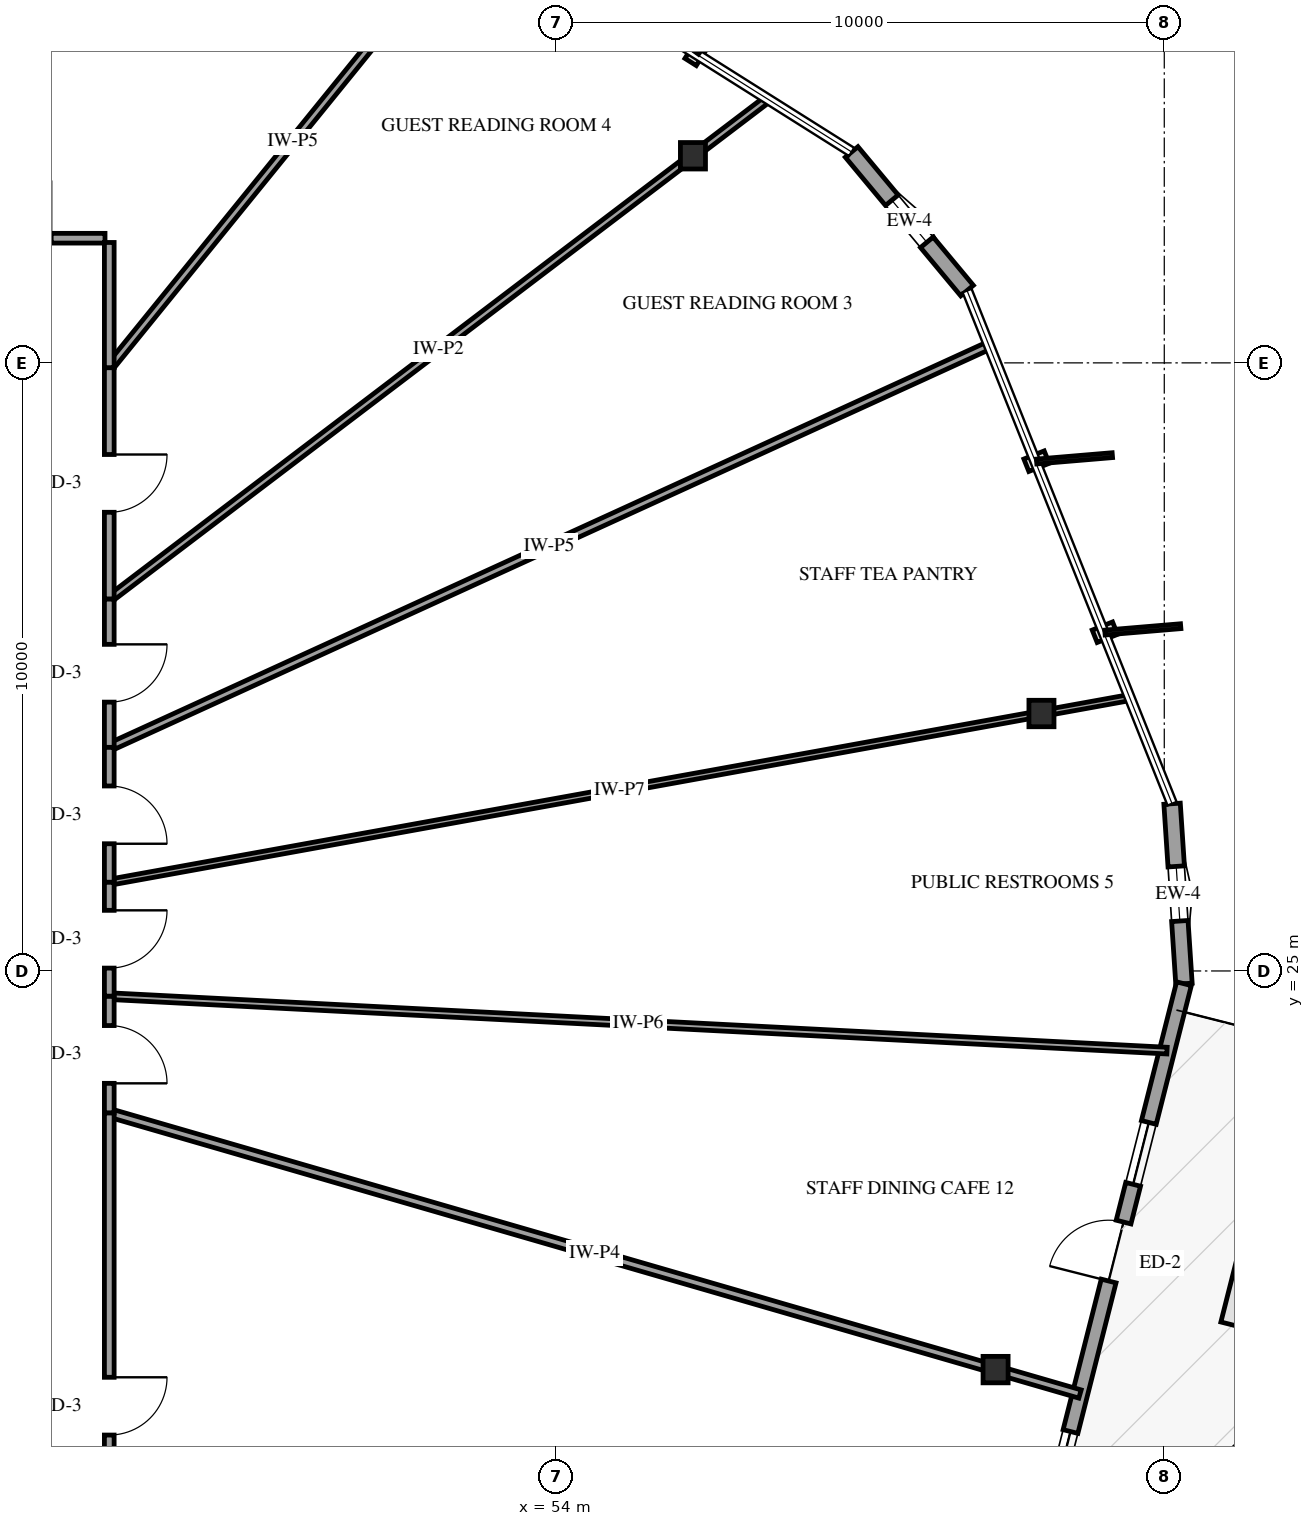
"""IFC4 building model, lengths in metres.
Left out: names, types, materials, properties, quantities, classifications, styles, units other than length and angle.
Written with IfcOpenShell. Run it as: python <this file> out.ifc"""

import sys

from ifc_helpers import new_model, si_unit, direction, frame, frame_2d, origin, origin_2d, place, context, subcontext, project, spatial, rectangle, i_section, extrude, element, fill, save


model = new_model("IFC4")
c1 = context("Model", 3, precision=1e-05, world=origin(), true_north=direction((0.0, 1.0)))
c2 = subcontext(c1, "Body", "Model", "MODEL_VIEW")
j1 = project(units=[si_unit("LENGTHUNIT", "METRE"), si_unit("PLANEANGLEUNIT", "RADIAN")], contexts=[c1])
p1 = place(None, origin())
s1 = spatial("IfcSite", under=j1, at=p1, CompositionType="ELEMENT")
p2 = place(p1, origin())
s2 = spatial("IfcBuilding", under=s1, at=p2, CompositionType="ELEMENT")
p3 = place(p2, frame((0.0, 0.0, 178.6)))
s3 = spatial("IfcBuildingStorey", under=s2, at=p3, CompositionType="ELEMENT", Elevation=178.6)
for number, where, z_axis, x_axis in (
    (1, (61.98, 29.234, 0.0), (0.0, 0.0, 1.0), (1.0, 0.0, 0.0)),
    (2, (56.249, 38.406, 0.0), (0.0, 0.0, 1.0), (1.0, 0.0, 0.0)),
    (3, (61.226, 18.444, 0.0), (0.0, 0.0, 1.0), (1.0, 0.0, 0.0)),
):
    element("IfcColumn", number, at=place(p3, frame(where, z_axis=z_axis, x_axis=x_axis)), inside=s3, PredefinedType="COLUMN", context=c2, shape_type="SweptSolid", body=[
        extrude(i_section(OverallWidth=0.412, OverallDepth=0.435, WebThickness=0.036, FlangeThickness=0.057, FilletRadius=0.038, at=origin_2d()), origin(), (0.0, 0.0, 1.0), 3.6),
    ])
p4 = place(p3, frame((64.324, 24.79, 0.0), z_axis=(0.0, 0.0, 1.0), x_axis=(-0.065923586617, 0.997824674343, 0.0)))
e4 = element("IfcWall", 4, at=p4, inside=s3, PredefinedType="SOLIDWALL", context=c2, shape_type="SweptSolid", body=[
    extrude(rectangle(XDim=2.966, YDim=0.27, at=frame_2d((1.483, 0.0))), origin(), (0.0, 0.0, 1.0), 2.679),
])
p5 = place(p4, frame((1.033, 0.0, 0.75)))
e5 = element("IfcOpeningElement", 5, at=p5, cuts=e4, PredefinedType="OPENING", context=c2, shape_type="SweptSolid", body=[
    extrude(rectangle(XDim=0.9, YDim=1.5, at=frame_2d((0.45, 0.75))), frame((0.0, 0.145, 0.0), z_axis=(0.0, -1.0, 0.0), x_axis=(1.0, 0.0, 0.0)), (0.0, 0.0, 1.0), 0.29),
])
p6 = place(p3, frame((62.092, 15.982, 0.0), z_axis=(0.0, 0.0, 1.0), x_axis=(0.245644624453, 0.969359952999, 0.0)))
e6 = element("IfcWall", 6, at=p6, inside=s3, PredefinedType="SOLIDWALL", context=c2, shape_type="SweptSolid", body=[
    extrude(rectangle(XDim=9.087, YDim=0.25, at=frame_2d((4.543, 0.0))), origin(), (0.0, 0.0, 1.0), 2.679),
])
p7 = place(p6, frame((4.043, 0.0, 0.0)))
e7 = element("IfcOpeningElement", 7, at=p7, cuts=e6, PredefinedType="OPENING", context=c2, shape_type="SweptSolid", body=[
    extrude(rectangle(XDim=1.0, YDim=2.15, at=frame_2d((0.5, 1.075))), frame((0.0, 0.135, 0.0), z_axis=(0.0, -1.0, 0.0), x_axis=(1.0, 0.0, 0.0)), (0.0, 0.0, 1.0), 0.27),
])
p8 = place(p6, frame((0.44, 0.0, 0.72)))
e8 = element("IfcOpeningElement", 8, at=p8, cuts=e6, PredefinedType="OPENING", context=c2, shape_type="SweptSolid", body=[
    extrude(rectangle(XDim=1.05, YDim=1.55, at=frame_2d((0.525, 0.775))), frame((0.0, 0.135, 0.0), z_axis=(0.0, -1.0, 0.0), x_axis=(1.0, 0.0, 0.0)), (0.0, 0.0, 1.0), 0.27),
])
p9 = place(p6, frame((5.684, 0.0, 0.72)))
e9 = element("IfcOpeningElement", 9, at=p9, cuts=e6, PredefinedType="OPENING", context=c2, shape_type="SweptSolid", body=[
    extrude(rectangle(XDim=1.05, YDim=1.55, at=frame_2d((0.525, 0.775))), frame((0.0, 0.135, 0.0), z_axis=(0.0, -1.0, 0.0), x_axis=(1.0, 0.0, 0.0)), (0.0, 0.0, 1.0), 0.27),
])
p10 = place(p3, frame((60.757, 36.189, 0.0), z_axis=(0.0, 0.0, 1.0), x_axis=(-0.639811943849, 0.768531506517, 0.0)))
e10 = element("IfcWall", 10, at=p10, inside=s3, PredefinedType="SOLIDWALL", context=c2, shape_type="SweptSolid", body=[
    extrude(rectangle(XDim=2.966, YDim=0.27, at=frame_2d((1.483, 0.0))), origin(), (0.0, 0.0, 1.0), 2.679),
])
p11 = place(p10, frame((1.033, 0.0, 0.75)))
e11 = element("IfcOpeningElement", 11, at=p11, cuts=e10, PredefinedType="OPENING", context=c2, shape_type="SweptSolid", body=[
    extrude(rectangle(XDim=0.9, YDim=1.5, at=frame_2d((0.45, 0.75))), frame((0.0, 0.145, 0.0), z_axis=(0.0, -1.0, 0.0), x_axis=(1.0, 0.0, 0.0)), (0.0, 0.0, 1.0), 0.29),
])
p12 = place(p3, frame((64.045, 23.69, 0.0), z_axis=(0.0, 0.0, 1.0), x_axis=(-0.998676057093, 0.051440577257, 0.0)))
e12 = element("IfcWall", 12, at=p12, inside=s3, PredefinedType="PARTITIONING", context=c2, shape_type="SweptSolid", body=[
    extrude(rectangle(XDim=17.418, YDim=0.11, at=frame_2d((8.709, 0.0))), origin(), (0.0, 0.0, 1.0), 3.3),
])
p13 = place(p3, frame((46.65, 26.458, 0.0), z_axis=(0.0, 0.0, 1.0), x_axis=(0.984003859074, 0.178147145156, 0.0)))
e13 = element("IfcWall", 13, at=p13, inside=s3, PredefinedType="PARTITIONING", context=c2, shape_type="SweptSolid", body=[
    extrude(rectangle(XDim=17.054, YDim=0.1, at=frame_2d((8.527, 0.0))), origin(), (0.0, 0.0, 1.0), 2.595),
])
p14 = place(p3, frame((46.65, 22.667, 0.0), z_axis=(0.0, 0.0, 1.0), x_axis=(0.960518719395, -0.278215365663, 0.0)))
e14 = element("IfcWall", 14, at=p14, inside=s3, PredefinedType="PARTITIONING", context=c2, shape_type="SweptSolid", body=[
    extrude(rectangle(XDim=16.62, YDim=0.14, at=frame_2d((8.31, 0.0))), origin(), (0.0, 0.0, 1.0), 2.674),
])
p15 = place(p3, frame((46.65, 28.677, 0.0), z_axis=(0.0, 0.0, 1.0), x_axis=(0.909584224625, 0.415519600395, 0.0)))
e15 = element("IfcWall", 15, at=p15, inside=s3, PredefinedType="PARTITIONING", context=c2, shape_type="SweptSolid", body=[
    extrude(rectangle(XDim=15.905, YDim=0.13, at=frame_2d((7.953, 0.0))), origin(), (0.0, 0.0, 1.0), 3.3),
])
p16 = place(p3, frame((46.65, 31.115, 0.0), z_axis=(0.0, 0.0, 1.0), x_axis=(0.796322023961, 0.60487290744, 0.0)))
e16 = element("IfcWall", 16, at=p16, inside=s3, PredefinedType="PARTITIONING", context=c2, shape_type="SweptSolid", body=[
    extrude(rectangle(XDim=13.596, YDim=0.12, at=frame_2d((6.798, 0.0))), origin(), (0.0, 0.0, 1.0), 3.3),
])
p17 = place(p3, frame((46.65, 22.667, 0.0), z_axis=(0.0, 0.0, 1.0), x_axis=(0.0, -1.0, 0.0)))
e17 = element("IfcWall", 17, at=p17, inside=s3, PredefinedType="PARTITIONING", context=c2, shape_type="SweptSolid", body=[
    extrude(rectangle(XDim=9.647, YDim=0.16, at=frame_2d((4.823, 0.0))), origin(), (0.0, 0.0, 1.0), 3.3),
])
p18 = place(p17, frame((4.349, 0.0, 0.0)))
e18 = element("IfcOpeningElement", 18, at=p18, cuts=e17, PredefinedType="OPENING", context=c2, shape_type="SweptSolid", body=[
    extrude(rectangle(XDim=0.95, YDim=2.15, at=frame_2d((0.475, 1.075))), frame((0.0, 0.09, 0.0), z_axis=(0.0, -1.0, 0.0), x_axis=(1.0, 0.0, 0.0)), (0.0, 0.0, 1.0), 0.18),
])
p19 = place(p3, frame((46.65, 34.921, 0.0), z_axis=(0.0, 0.0, 1.0), x_axis=(0.630137710879, 0.776483396685, 0.0)))
e19 = element("IfcWall", 19, at=p19, inside=s3, PredefinedType="PARTITIONING", context=c2, shape_type="SweptSolid", body=[
    extrude(rectangle(XDim=9.579, YDim=0.13, at=frame_2d((4.79, 0.0))), origin(), (0.0, 0.0, 1.0), 3.3),
])
p20 = place(p3, frame((43.86, 37.05, 0.0), z_axis=(0.0, 0.0, 1.0), x_axis=(0.400052953887, 0.916492026199, 0.0)))
e20 = element("IfcWall", 20, at=p20, inside=s3, PredefinedType="PARTITIONING", context=c2, shape_type="SweptSolid", body=[
    extrude(rectangle(XDim=7.526, YDim=0.12, at=frame_2d((3.763, 0.0))), origin(), (0.0, 0.0, 1.0), 2.595),
])
p21 = place(p3, frame((46.65, 34.921, 0.0), z_axis=(0.0, 0.0, 1.0), x_axis=(0.0, -1.0, 0.0)))
e21 = element("IfcWall", 21, at=p21, inside=s3, PredefinedType="PARTITIONING", context=c2, shape_type="SweptSolid", body=[
    extrude(rectangle(XDim=3.806, YDim=0.16, at=frame_2d((1.903, 0.0))), origin(), (0.0, 0.0, 1.0), 3.3),
])
p22 = place(p21, frame((1.428, 0.0, 0.0)))
e22 = element("IfcOpeningElement", 22, at=p22, cuts=e21, PredefinedType="OPENING", context=c2, shape_type="SweptSolid", body=[
    extrude(rectangle(XDim=0.95, YDim=2.15, at=frame_2d((0.475, 1.075))), frame((0.0, 0.09, 0.0), z_axis=(0.0, -1.0, 0.0), x_axis=(1.0, 0.0, 0.0)), (0.0, 0.0, 1.0), 0.18),
])
p23 = place(p3, frame((43.86, 37.05, 0.0), z_axis=(0.0, 0.0, 1.0), x_axis=(1.0, 0.0, 0.0)))
e23 = element("IfcWall", 23, at=p23, inside=s3, PredefinedType="PARTITIONING", context=c2, shape_type="SweptSolid", body=[
    extrude(rectangle(XDim=2.72, YDim=0.16, at=frame_2d((1.36, 0.0))), origin(), (0.0, 0.0, 1.0), 3.3),
])
p24 = place(p23, frame((0.885, 0.0, 0.0)))
e24 = element("IfcOpeningElement", 24, at=p24, cuts=e23, PredefinedType="OPENING", context=c2, shape_type="SweptSolid", body=[
    extrude(rectangle(XDim=0.95, YDim=2.15, at=frame_2d((0.475, 1.075))), frame((0.0, 0.09, 0.0), z_axis=(0.0, -1.0, 0.0), x_axis=(1.0, 0.0, 0.0)), (0.0, 0.0, 1.0), 0.18),
])
p25 = place(p3, frame((46.65, 31.115, 0.0), z_axis=(0.0, 0.0, 1.0), x_axis=(0.0, -1.0, 0.0)))
e25 = element("IfcWall", 25, at=p25, inside=s3, PredefinedType="PARTITIONING", context=c2, shape_type="SweptSolid", body=[
    extrude(rectangle(XDim=2.438, YDim=0.16, at=frame_2d((1.219, 0.0))), origin(), (0.0, 0.0, 1.0), 3.3),
])
p26 = place(p25, frame((0.744, 0.0, 0.0)))
e26 = element("IfcOpeningElement", 26, at=p26, cuts=e25, PredefinedType="OPENING", context=c2, shape_type="SweptSolid", body=[
    extrude(rectangle(XDim=0.95, YDim=2.15, at=frame_2d((0.475, 1.075))), frame((0.0, 0.09, 0.0), z_axis=(0.0, -1.0, 0.0), x_axis=(1.0, 0.0, 0.0)), (0.0, 0.0, 1.0), 0.18),
])
p27 = place(p3, frame((46.65, 28.677, 0.0), z_axis=(0.0, 0.0, 1.0), x_axis=(0.0, -1.0, 0.0)))
e27 = element("IfcWall", 27, at=p27, inside=s3, PredefinedType="PARTITIONING", context=c2, shape_type="SweptSolid", body=[
    extrude(rectangle(XDim=2.219, YDim=0.16, at=frame_2d((1.109, 0.0))), origin(), (0.0, 0.0, 1.0), 3.3),
])
p28 = place(p27, frame((0.635, 0.0, 0.0)))
e28 = element("IfcOpeningElement", 28, at=p28, cuts=e27, PredefinedType="OPENING", context=c2, shape_type="SweptSolid", body=[
    extrude(rectangle(XDim=0.95, YDim=2.15, at=frame_2d((0.475, 1.075))), frame((0.0, 0.09, 0.0), z_axis=(0.0, -1.0, 0.0), x_axis=(1.0, 0.0, 0.0)), (0.0, 0.0, 1.0), 0.18),
])
p29 = place(p3, frame((46.65, 36.98, 0.0), z_axis=(0.0, 0.0, 1.0), x_axis=(0.0, -1.0, 0.0)))
e29 = element("IfcWall", 29, at=p29, inside=s3, PredefinedType="PARTITIONING", context=c2, shape_type="SweptSolid", body=[
    extrude(rectangle(XDim=2.059, YDim=0.16, at=frame_2d((1.03, 0.0))), origin(), (0.0, 0.0, 1.0), 3.3),
])
p30 = place(p3, frame((46.65, 24.586, 0.0), z_axis=(0.0, 0.0, 1.0), x_axis=(0.0, -1.0, 0.0)))
e30 = element("IfcWall", 30, at=p30, inside=s3, PredefinedType="PARTITIONING", context=c2, shape_type="SweptSolid", body=[
    extrude(rectangle(XDim=1.919, YDim=0.16, at=frame_2d((0.959, 0.0))), origin(), (0.0, 0.0, 1.0), 3.3),
])
p31 = place(p30, frame((0.484, 0.0, 0.0)))
e31 = element("IfcOpeningElement", 31, at=p31, cuts=e30, PredefinedType="OPENING", context=c2, shape_type="SweptSolid", body=[
    extrude(rectangle(XDim=0.95, YDim=2.15, at=frame_2d((0.475, 1.075))), frame((0.0, 0.09, 0.0), z_axis=(0.0, -1.0, 0.0), x_axis=(1.0, 0.0, 0.0)), (0.0, 0.0, 1.0), 0.18),
])
p32 = place(p3, frame((46.65, 26.458, 0.0), z_axis=(0.0, 0.0, 1.0), x_axis=(0.0, -1.0, 0.0)))
e32 = element("IfcWall", 32, at=p32, inside=s3, PredefinedType="PARTITIONING", context=c2, shape_type="SweptSolid", body=[
    extrude(rectangle(XDim=1.872, YDim=0.16, at=frame_2d((0.936, 0.0))), origin(), (0.0, 0.0, 1.0), 3.3),
])
p33 = place(p32, frame((0.461, 0.0, 0.0)))
e33 = element("IfcOpeningElement", 33, at=p33, cuts=e32, PredefinedType="OPENING", context=c2, shape_type="SweptSolid", body=[
    extrude(rectangle(XDim=0.95, YDim=2.15, at=frame_2d((0.475, 1.075))), frame((0.0, 0.09, 0.0), z_axis=(0.0, -1.0, 0.0), x_axis=(1.0, 0.0, 0.0)), (0.0, 0.0, 1.0), 0.18),
])
p34 = place(p5, origin())
e34 = element("IfcWindow", 34, at=p34, inside=s3, PartitioningType="SINGLE_PANEL", PredefinedType="WINDOW", context=c2, shape_type="SweptSolid", body=[
    extrude(rectangle(XDim=0.9, YDim=1.5, at=frame_2d((0.45, 0.75))), frame((0.0, 0.03, 0.0), z_axis=(0.0, -1.0, 0.0), x_axis=(1.0, 0.0, 0.0)), (0.0, 0.0, 1.0), 0.06),
])
fill(e5, e34)
p35 = place(p7, origin())
e35 = element("IfcDoor", 35, at=p35, inside=s3, OperationType="SINGLE_SWING_LEFT", PredefinedType="DOOR", context=c2, shape_type="SweptSolid", body=[
    extrude(rectangle(XDim=1.0, YDim=2.15, at=frame_2d((0.5, 1.075))), frame((0.0, 0.025, 0.0), z_axis=(0.0, -1.0, 0.0), x_axis=(1.0, 0.0, 0.0)), (0.0, 0.0, 1.0), 0.05),
])
fill(e7, e35)
p36 = place(p8, origin())
e36 = element("IfcWindow", 36, at=p36, inside=s3, PartitioningType="SINGLE_PANEL", PredefinedType="WINDOW", context=c2, shape_type="SweptSolid", body=[
    extrude(rectangle(XDim=1.05, YDim=1.55, at=frame_2d((0.525, 0.775))), frame((0.0, 0.03, 0.0), z_axis=(0.0, -1.0, 0.0), x_axis=(1.0, 0.0, 0.0)), (0.0, 0.0, 1.0), 0.06),
])
fill(e8, e36)
p37 = place(p9, origin())
e37 = element("IfcWindow", 37, at=p37, inside=s3, PartitioningType="SINGLE_PANEL", PredefinedType="WINDOW", context=c2, shape_type="SweptSolid", body=[
    extrude(rectangle(XDim=1.05, YDim=1.55, at=frame_2d((0.525, 0.775))), frame((0.0, 0.03, 0.0), z_axis=(0.0, -1.0, 0.0), x_axis=(1.0, 0.0, 0.0)), (0.0, 0.0, 1.0), 0.06),
])
fill(e9, e37)
p38 = place(p11, origin())
e38 = element("IfcWindow", 38, at=p38, inside=s3, PartitioningType="SINGLE_PANEL", PredefinedType="WINDOW", context=c2, shape_type="SweptSolid", body=[
    extrude(rectangle(XDim=0.9, YDim=1.5, at=frame_2d((0.45, 0.75))), frame((0.0, 0.03, 0.0), z_axis=(0.0, -1.0, 0.0), x_axis=(1.0, 0.0, 0.0)), (0.0, 0.0, 1.0), 0.06),
])
fill(e11, e38)
p39 = place(p18, origin())
e39 = element("IfcDoor", 39, at=p39, inside=s3, OperationType="SINGLE_SWING_LEFT", PredefinedType="DOOR", context=c2, shape_type="SweptSolid", body=[
    extrude(rectangle(XDim=0.95, YDim=2.15, at=frame_2d((0.475, 1.075))), frame((0.0, 0.025, 0.0), z_axis=(0.0, -1.0, 0.0), x_axis=(1.0, 0.0, 0.0)), (0.0, 0.0, 1.0), 0.05),
])
fill(e18, e39)
p40 = place(p22, origin())
e40 = element("IfcDoor", 40, at=p40, inside=s3, OperationType="SINGLE_SWING_LEFT", PredefinedType="DOOR", context=c2, shape_type="SweptSolid", body=[
    extrude(rectangle(XDim=0.95, YDim=2.15, at=frame_2d((0.475, 1.075))), frame((0.0, 0.025, 0.0), z_axis=(0.0, -1.0, 0.0), x_axis=(1.0, 0.0, 0.0)), (0.0, 0.0, 1.0), 0.05),
])
fill(e22, e40)
p41 = place(p26, origin())
e41 = element("IfcDoor", 41, at=p41, inside=s3, OperationType="SINGLE_SWING_LEFT", PredefinedType="DOOR", context=c2, shape_type="SweptSolid", body=[
    extrude(rectangle(XDim=0.95, YDim=2.15, at=frame_2d((0.475, 1.075))), frame((0.0, 0.025, 0.0), z_axis=(0.0, -1.0, 0.0), x_axis=(1.0, 0.0, 0.0)), (0.0, 0.0, 1.0), 0.05),
])
fill(e26, e41)
p42 = place(p28, origin())
e42 = element("IfcDoor", 42, at=p42, inside=s3, OperationType="SINGLE_SWING_RIGHT", PredefinedType="DOOR", context=c2, shape_type="SweptSolid", body=[
    extrude(rectangle(XDim=0.95, YDim=2.15, at=frame_2d((0.475, 1.075))), frame((0.0, 0.025, 0.0), z_axis=(0.0, -1.0, 0.0), x_axis=(1.0, 0.0, 0.0)), (0.0, 0.0, 1.0), 0.05),
])
fill(e28, e42)
p43 = place(p31, origin())
e43 = element("IfcDoor", 43, at=p43, inside=s3, OperationType="SINGLE_SWING_RIGHT", PredefinedType="DOOR", context=c2, shape_type="SweptSolid", body=[
    extrude(rectangle(XDim=0.95, YDim=2.15, at=frame_2d((0.475, 1.075))), frame((0.0, 0.025, 0.0), z_axis=(0.0, -1.0, 0.0), x_axis=(1.0, 0.0, 0.0)), (0.0, 0.0, 1.0), 0.05),
])
fill(e31, e43)
p44 = place(p33, origin())
e44 = element("IfcDoor", 44, at=p44, inside=s3, OperationType="SINGLE_SWING_LEFT", PredefinedType="DOOR", context=c2, shape_type="SweptSolid", body=[
    extrude(rectangle(XDim=0.95, YDim=2.15, at=frame_2d((0.475, 1.075))), frame((0.0, 0.025, 0.0), z_axis=(0.0, -1.0, 0.0), x_axis=(1.0, 0.0, 0.0)), (0.0, 0.0, 1.0), 0.05),
])
fill(e33, e44)
save(model, sys.argv[1])
